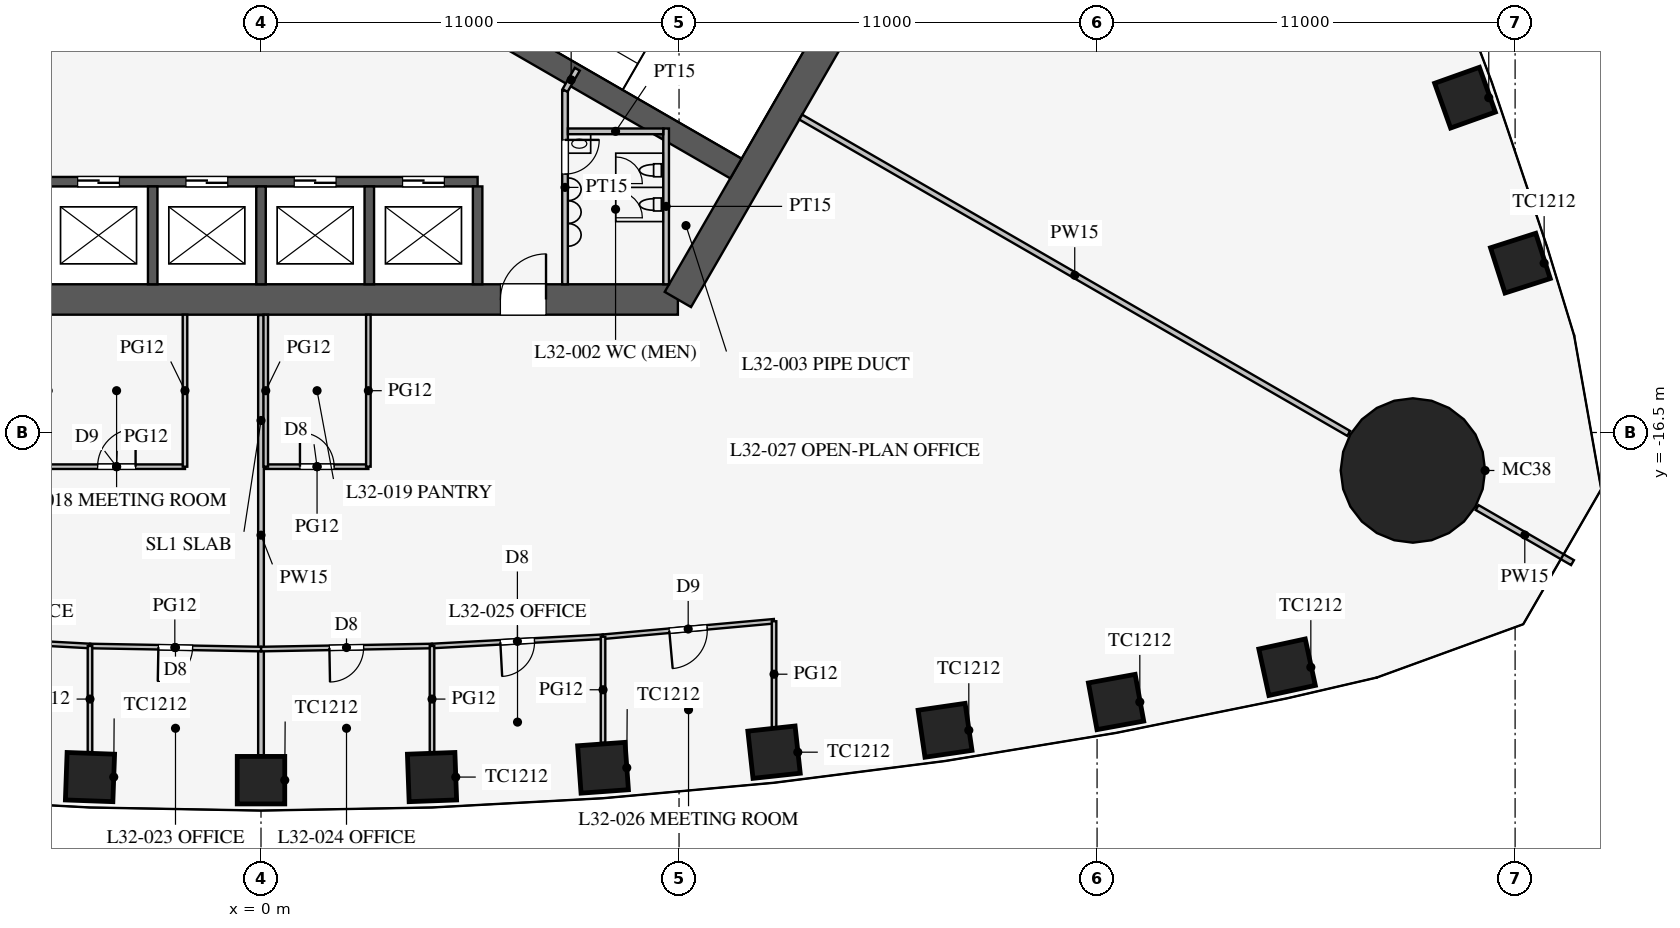
"""IFC4 building model, lengths in metres.
Left out: names, types, materials, properties, quantities, classifications, styles, units other than length and angle.
Written with IfcOpenShell. Run it as: python <this file> out.ifc"""

import sys

from ifc_helpers import new_model, si_unit, direction, frame, frame_2d, origin, origin_2d, place, context, subcontext, project, spatial, rectangle, circle, extrude, element, fill, save


model = new_model("IFC4")
c1 = context("Model", 3, precision=1e-05, world=origin(), true_north=direction((0.0, 1.0)))
c2 = subcontext(c1, "Body", "Model", "MODEL_VIEW")
j1 = project(units=[si_unit("LENGTHUNIT", "METRE"), si_unit("PLANEANGLEUNIT", "RADIAN")], contexts=[c1])
p1 = place(None, origin())
s1 = spatial("IfcSite", under=j1, at=p1, CompositionType="ELEMENT")
p2 = place(p1, origin())
s2 = spatial("IfcBuilding", under=s1, at=p2, CompositionType="ELEMENT")
p3 = place(p2, frame((0.0, 0.0, 140.9)))
s3 = spatial("IfcBuildingStorey", under=s2, at=p3, CompositionType="ELEMENT", Elevation=140.9)
for number, where, z_axis, x_axis in (
    (1, (-4.5, -25.568, 0.0), (0.0, 0.0, 1.0), (0.999, -0.036, 0.0)),
    (2, (0.0, -25.65, 0.0), (0.0, 0.0, 1.0), (1.0, 0.0, 0.0)),
    (3, (4.5, -25.568, 0.0), (0.0, 0.0, 1.0), (0.999, 0.036, 0.0)),
    (4, (9.0, -25.323, 0.0), (0.0, 0.0, 1.0), (0.997, 0.072, 0.0)),
    (5, (13.5, -24.913, 0.0), (0.0, 0.0, 1.0), (0.994, 0.108, 0.0)),
    (6, (18.0, -24.337, 0.0), (0.0, 0.0, 1.0), (0.99, 0.144, 0.0)),
    (7, (22.5, -23.593, 0.0), (0.0, 0.0, 1.0), (0.984, 0.18, 0.0)),
    (8, (27.0, -22.677, 0.0), (0.0, 0.0, 1.0), (0.977, 0.212, 0.0)),
    (9, (33.139, -12.044, 0.0), (0.0, 0.0, 1.0), (-0.305, 0.952, 0.0)),
    (10, (31.682, -7.689, 0.0), (0.0, 0.0, 1.0), (-0.336, 0.942, 0.0)),
):
    element("IfcColumn", number, at=place(p3, frame(where, z_axis=z_axis, x_axis=x_axis)), inside=s3, PredefinedType="COLUMN", context=c2, shape_type="SweptSolid", body=[
        extrude(rectangle(XDim=1.25, YDim=1.25, at=origin_2d()), origin(), (0.0, 0.0, 1.0), 4.2),
    ])
p4 = place(p3, frame((30.311, -17.5, 0.0), z_axis=(0.0, 0.0, 1.0), x_axis=(1.0, 0.0, 0.0)))
e11 = element("IfcColumn", 11, at=p4, inside=s3, PredefinedType="COLUMN", context=c2, shape_type="SweptSolid", body=[
    extrude(circle(Radius=1.9, at=origin_2d()), origin(), (0.0, 0.0, 1.0), 4.2),
])
p5 = place(p3, frame((-10.97, -13.0, 0.0), z_axis=(0.0, 0.0, 1.0), x_axis=(1.0, 0.0, 0.0)))
e12 = element("IfcWall", 12, at=p5, inside=s3, PredefinedType="SHEAR", context=c2, shape_type="SweptSolid", body=[
    extrude(rectangle(XDim=21.939, YDim=0.8, at=frame_2d((10.97, 0.0))), origin(), (0.0, 0.0, 1.0), 4.2),
])
p6 = place(p5, frame((17.27, 0.0, 0.0)))
e13 = element("IfcOpeningElement", 13, at=p6, cuts=e12, PredefinedType="OPENING", context=c2, shape_type="SweptSolid", body=[
    extrude(rectangle(XDim=1.2, YDim=2.1, at=frame_2d((0.6, 1.05))), frame((0.0, 0.41, 0.0), z_axis=(0.0, -1.0, 0.0), x_axis=(1.0, 0.0, 0.0)), (0.0, 0.0, 1.0), 0.82),
])
p7 = place(p5, frame((3.47, 0.0, 0.0)))
e14 = element("IfcOpeningElement", 14, at=p7, cuts=e12, PredefinedType="OPENING", context=c2, shape_type="SweptSolid", body=[
    extrude(rectangle(XDim=1.2, YDim=2.1, at=frame_2d((0.6, 1.05))), frame((0.0, 0.41, 0.0), z_axis=(0.0, -1.0, 0.0), x_axis=(1.0, 0.0, 0.0)), (0.0, 0.0, 1.0), 0.82),
])
p8 = place(p3, frame((10.97, -13.0, 0.0), z_axis=(0.0, 0.0, 1.0), x_axis=(0.499995765644, 0.866027848477, 0.0)))
e15 = element("IfcWall", 15, at=p8, inside=s3, PredefinedType="SHEAR", context=c2, shape_type="SweptSolid", body=[
    extrude(rectangle(XDim=11.547, YDim=0.8, at=frame_2d((5.773, 0.0))), origin(), (0.0, 0.0, 1.0), 4.2),
])
p9 = place(p3, frame((-5.7, -9.9, 0.0), z_axis=(0.0, 0.0, 1.0), x_axis=(1.0, 0.0, 0.0)))
e16 = element("IfcWall", 16, at=p9, inside=s3, PredefinedType="SHEAR", context=c2, shape_type="SweptSolid", body=[
    extrude(rectangle(XDim=11.4, YDim=0.25, at=frame_2d((5.7, 0.0))), origin(), (0.0, 0.0, 1.0), 4.2),
])
p10 = place(p9, frame((0.875, 0.0, 0.0)))
e17 = element("IfcOpeningElement", 17, at=p10, cuts=e16, PredefinedType="OPENING", context=c2, shape_type="SweptSolid", body=[
    extrude(rectangle(XDim=1.1, YDim=2.2, at=frame_2d((0.55, 1.1))), frame((0.0, 0.135, 0.0), z_axis=(0.0, -1.0, 0.0), x_axis=(1.0, 0.0, 0.0)), (0.0, 0.0, 1.0), 0.27),
])
p11 = place(p9, frame((3.725, 0.0, 0.0)))
e18 = element("IfcOpeningElement", 18, at=p11, cuts=e16, PredefinedType="OPENING", context=c2, shape_type="SweptSolid", body=[
    extrude(rectangle(XDim=1.1, YDim=2.2, at=frame_2d((0.55, 1.1))), frame((0.0, 0.135, 0.0), z_axis=(0.0, -1.0, 0.0), x_axis=(1.0, 0.0, 0.0)), (0.0, 0.0, 1.0), 0.27),
])
p12 = place(p9, frame((6.575, 0.0, 0.0)))
e19 = element("IfcOpeningElement", 19, at=p12, cuts=e16, PredefinedType="OPENING", context=c2, shape_type="SweptSolid", body=[
    extrude(rectangle(XDim=1.1, YDim=2.2, at=frame_2d((0.55, 1.1))), frame((0.0, 0.135, 0.0), z_axis=(0.0, -1.0, 0.0), x_axis=(1.0, 0.0, 0.0)), (0.0, 0.0, 1.0), 0.27),
])
p13 = place(p9, frame((9.425, 0.0, 0.0)))
e20 = element("IfcOpeningElement", 20, at=p13, cuts=e16, PredefinedType="OPENING", context=c2, shape_type="SweptSolid", body=[
    extrude(rectangle(XDim=1.1, YDim=2.2, at=frame_2d((0.55, 1.1))), frame((0.0, 0.135, 0.0), z_axis=(0.0, -1.0, 0.0), x_axis=(1.0, 0.0, 0.0)), (0.0, 0.0, 1.0), 0.27),
])
for number, where, z_axis, x_axis in (
    (21, (-2.85, -10.025, 0.0), (0.0, 0.0, 1.0), (0.0, -1.0, 0.0)),
    (22, (0.0, -10.025, 0.0), (0.0, 0.0, 1.0), (0.0, -1.0, 0.0)),
    (23, (2.85, -10.025, 0.0), (0.0, 0.0, 1.0), (0.0, -1.0, 0.0)),
    (24, (5.7, -10.025, 0.0), (0.0, 0.0, 1.0), (0.0, -1.0, 0.0)),
):
    element("IfcWall", number, at=place(p3, frame(where, z_axis=z_axis, x_axis=x_axis)), inside=s3, PredefinedType="SHEAR", context=c2, shape_type="SweptSolid", body=[
        extrude(rectangle(XDim=2.575, YDim=0.25, at=frame_2d((1.288, 0.0))), origin(), (0.0, 0.0, 1.0), 4.2),
    ])
for number, where, z_axis, x_axis in (
    (25, (4.638, -5.016, 0.0), (0.0, 0.0, 1.0), (0.866, -0.5, 0.0)),
    (26, (-4.638, -5.016, 0.0), (0.0, 0.0, 1.0), (-0.866, -0.5, 0.0)),
):
    element("IfcWall", number, at=place(p3, frame(where, z_axis=z_axis, x_axis=x_axis)), inside=s3, PredefinedType="SHEAR", context=c2, shape_type="SweptSolid", body=[
        extrude(rectangle(XDim=9.075, YDim=0.6, at=frame_2d((4.538, 0.0))), origin(), (0.0, 0.0, 1.0), 4.2),
    ])
p14 = place(p3, frame((8.0, -7.5, 0.0), z_axis=(0.0, 0.0, 1.0), x_axis=(0.0, -1.0, 0.0)))
e27 = element("IfcWall", 27, at=p14, inside=s3, PredefinedType="PARTITIONING", context=c2, shape_type="SweptSolid", body=[
    extrude(rectangle(XDim=5.1, YDim=0.15, at=frame_2d((2.55, 0.0))), origin(), (0.0, 0.0, 1.0), 4.0),
])
p15 = place(p14, frame((1.3, 0.0, 0.0)))
e28 = element("IfcOpeningElement", 28, at=p15, cuts=e27, PredefinedType="OPENING", context=c2, shape_type="SweptSolid", body=[
    extrude(rectangle(XDim=0.9, YDim=2.1, at=frame_2d((0.45, 1.05))), frame((0.0, 0.085, 0.0), z_axis=(0.0, -1.0, 0.0), x_axis=(1.0, 0.0, 0.0)), (0.0, 0.0, 1.0), 0.17),
])
p16 = place(p3, frame((8.0, -7.5, 0.0), z_axis=(0.0, 0.0, 1.0), x_axis=(0.499842556608, 0.866116284689, 0.0)))
e29 = element("IfcWall", 29, at=p16, inside=s3, PredefinedType="PARTITIONING", context=c2, shape_type="SweptSolid", body=[
    extrude(rectangle(XDim=0.645, YDim=0.15, at=frame_2d((0.323, 0.0))), origin(), (0.0, 0.0, 1.0), 4.0),
])
p17 = place(p3, frame((10.66, -8.5, 0.0), z_axis=(0.0, 0.0, 1.0), x_axis=(0.0, -1.0, 0.0)))
e30 = element("IfcWall", 30, at=p17, inside=s3, PredefinedType="PARTITIONING", context=c2, shape_type="SweptSolid", body=[
    extrude(rectangle(XDim=4.1, YDim=0.15, at=frame_2d((2.05, 0.0))), origin(), (0.0, 0.0, 1.0), 4.0),
])
p18 = place(p3, frame((8.075, -8.575, 0.0), z_axis=(0.0, 0.0, 1.0), x_axis=(1.0, 0.0, 0.0)))
e31 = element("IfcWall", 31, at=p18, inside=s3, PredefinedType="PARTITIONING", context=c2, shape_type="SweptSolid", body=[
    extrude(rectangle(XDim=2.51, YDim=0.15, at=frame_2d((1.255, 0.0))), origin(), (0.0, 0.0, 1.0), 4.0),
])
p19 = place(p3, frame((14.203, -8.2, 0.0), z_axis=(0.0, 0.0, 1.0), x_axis=(0.866024668836, -0.500001272966, 0.0)))
e32 = element("IfcWall", 32, at=p19, inside=s3, PredefinedType="PARTITIONING", context=c2, shape_type="SweptSolid", body=[
    extrude(rectangle(XDim=16.65, YDim=0.15, at=frame_2d((8.325, 0.0))), origin(), (0.0, 0.0, 1.0), 2.3),
])
p20 = place(p3, frame((32.0, -18.475, 0.0), z_axis=(0.0, 0.0, 1.0), x_axis=(0.866042548026, -0.499970304126, 0.0)))
e33 = element("IfcWall", 33, at=p20, inside=s3, PredefinedType="PARTITIONING", context=c2, shape_type="SweptSolid", body=[
    extrude(rectangle(XDim=2.899, YDim=0.15, at=frame_2d((1.45, 0.0))), origin(), (0.0, 0.0, 1.0), 2.3),
])
p21 = place(p3, frame((0.0, -13.41, 0.0), z_axis=(0.0, 0.0, 1.0), x_axis=(0.0, -1.0, 0.0)))
e34 = element("IfcWall", 34, at=p21, inside=s3, PredefinedType="PARTITIONING", context=c2, shape_type="SweptSolid", body=[
    extrude(rectangle(XDim=11.585, YDim=0.15, at=frame_2d((5.792, 0.0))), origin(), (0.0, 0.0, 1.0), 3.2),
])
p22 = place(p3, frame((0.125, -17.4, 0.0), z_axis=(0.0, 0.0, 1.0), x_axis=(1.0, 0.0, 0.0)))
e35 = element("IfcWall", 35, at=p22, inside=s3, PredefinedType="PARTITIONING", context=c2, shape_type="SweptSolid", body=[
    extrude(rectangle(XDim=2.7, YDim=0.12, at=frame_2d((1.35, 0.0))), origin(), (0.0, 0.0, 1.0), 2.9),
])
p23 = place(p22, frame((0.9, 0.0, 0.15)))
e36 = element("IfcOpeningElement", 36, at=p23, cuts=e35, PredefinedType="OPENING", context=c2, shape_type="SweptSolid", body=[
    extrude(rectangle(XDim=0.9, YDim=2.1, at=frame_2d((0.45, 1.05))), frame((0.0, 0.07, 0.0), z_axis=(0.0, -1.0, 0.0), x_axis=(1.0, 0.0, 0.0)), (0.0, 0.0, 1.0), 0.14),
])
p24 = place(p3, frame((-5.6, -17.4, 0.0), z_axis=(0.0, 0.0, 1.0), x_axis=(1.0, 0.0, 0.0)))
e37 = element("IfcWall", 37, at=p24, inside=s3, PredefinedType="PARTITIONING", context=c2, shape_type="SweptSolid", body=[
    extrude(rectangle(XDim=3.6, YDim=0.12, at=frame_2d((1.8, 0.0))), origin(), (0.0, 0.0, 1.0), 2.9),
])
p25 = place(p24, frame((1.3, 0.0, 0.15)))
e38 = element("IfcOpeningElement", 38, at=p25, cuts=e37, PredefinedType="OPENING", context=c2, shape_type="SweptSolid", body=[
    extrude(rectangle(XDim=1.0, YDim=2.1, at=frame_2d((0.5, 1.05))), frame((0.0, 0.07, 0.0), z_axis=(0.0, -1.0, 0.0), x_axis=(1.0, 0.0, 0.0)), (0.0, 0.0, 1.0), 0.14),
])
for number, where, z_axis, x_axis in (
    (39, (0.125, -13.4, 0.0), (0.0, 0.0, 1.0), (0.0, -1.0, 0.0)),
    (40, (2.825, -13.4, 0.0), (0.0, 0.0, 1.0), (0.0, -1.0, 0.0)),
    (41, (-2.0, -13.4, 0.0), (0.0, 0.0, 1.0), (0.0, -1.0, 0.0)),
):
    element("IfcWall", number, at=place(p3, frame(where, z_axis=z_axis, x_axis=x_axis)), inside=s3, PredefinedType="PARTITIONING", context=c2, shape_type="SweptSolid", body=[
        extrude(rectangle(XDim=4.0, YDim=0.12, at=frame_2d((2.0, 0.0))), origin(), (0.0, 0.0, 1.0), 2.9),
    ])
p26 = place(p3, frame((0.0, -22.2, 0.0), z_axis=(0.0, 0.0, 1.0), x_axis=(0.999837820638, 0.018009231578, 0.0)))
e42 = element("IfcWall", 42, at=p26, inside=s3, PredefinedType="PARTITIONING", context=c2, shape_type="SweptSolid", body=[
    extrude(rectangle(XDim=4.501, YDim=0.12, at=frame_2d((2.25, 0.0))), origin(), (0.0, 0.0, 1.0), 2.9),
])
p27 = place(p26, frame((1.8, 0.0, 0.15)))
e43 = element("IfcOpeningElement", 43, at=p27, cuts=e42, PredefinedType="OPENING", context=c2, shape_type="SweptSolid", body=[
    extrude(rectangle(XDim=0.9, YDim=2.1, at=frame_2d((0.45, 1.05))), frame((0.0, 0.07, 0.0), z_axis=(0.0, -1.0, 0.0), x_axis=(1.0, 0.0, 0.0)), (0.0, 0.0, 1.0), 0.14),
])
p28 = place(p3, frame((4.5, -22.119, 0.0), z_axis=(0.0, 0.0, 1.0), x_axis=(0.998537376538, 0.054065771581, 0.0)))
e44 = element("IfcWall", 44, at=p28, inside=s3, PredefinedType="PARTITIONING", context=c2, shape_type="SweptSolid", body=[
    extrude(rectangle(XDim=4.507, YDim=0.12, at=frame_2d((2.253, 0.0))), origin(), (0.0, 0.0, 1.0), 2.9),
])
p29 = place(p28, frame((1.8, 0.0, 0.15)))
e45 = element("IfcOpeningElement", 45, at=p29, cuts=e44, PredefinedType="OPENING", context=c2, shape_type="SweptSolid", body=[
    extrude(rectangle(XDim=0.9, YDim=2.1, at=frame_2d((0.45, 1.05))), frame((0.0, 0.07, 0.0), z_axis=(0.0, -1.0, 0.0), x_axis=(1.0, 0.0, 0.0)), (0.0, 0.0, 1.0), 0.14),
])
p30 = place(p3, frame((9.0, -21.875, 0.0), z_axis=(0.0, 0.0, 1.0), x_axis=(0.995930325215, 0.090126507295, 0.0)))
e46 = element("IfcWall", 46, at=p30, inside=s3, PredefinedType="PARTITIONING", context=c2, shape_type="SweptSolid", body=[
    extrude(rectangle(XDim=4.518, YDim=0.12, at=frame_2d((2.259, 0.0))), origin(), (0.0, 0.0, 1.0), 2.9),
])
p31 = place(p30, frame((1.75, 0.0, 0.15)))
e47 = element("IfcOpeningElement", 47, at=p31, cuts=e46, PredefinedType="OPENING", context=c2, shape_type="SweptSolid", body=[
    extrude(rectangle(XDim=1.0, YDim=2.1, at=frame_2d((0.5, 1.05))), frame((0.0, 0.07, 0.0), z_axis=(0.0, -1.0, 0.0), x_axis=(1.0, 0.0, 0.0)), (0.0, 0.0, 1.0), 0.14),
])
p32 = place(p3, frame((-4.5, -22.119, 0.0), z_axis=(0.0, 0.0, 1.0), x_axis=(0.999837820638, -0.018009231578, 0.0)))
e48 = element("IfcWall", 48, at=p32, inside=s3, PredefinedType="PARTITIONING", context=c2, shape_type="SweptSolid", body=[
    extrude(rectangle(XDim=4.501, YDim=0.12, at=frame_2d((2.25, 0.0))), origin(), (0.0, 0.0, 1.0), 2.9),
])
p33 = place(p32, frame((1.8, 0.0, 0.15)))
e49 = element("IfcOpeningElement", 49, at=p33, cuts=e48, PredefinedType="OPENING", context=c2, shape_type="SweptSolid", body=[
    extrude(rectangle(XDim=0.9, YDim=2.1, at=frame_2d((0.45, 1.05))), frame((0.0, 0.07, 0.0), z_axis=(0.0, -1.0, 0.0), x_axis=(1.0, 0.0, 0.0)), (0.0, 0.0, 1.0), 0.14),
])
p34 = place(p3, frame((-9.0, -21.875, 0.0), z_axis=(0.0, 0.0, 1.0), x_axis=(0.998537376538, -0.054065771581, 0.0)))
e50 = element("IfcWall", 50, at=p34, inside=s3, PredefinedType="PARTITIONING", context=c2, shape_type="SweptSolid", body=[
    extrude(rectangle(XDim=4.507, YDim=0.12, at=frame_2d((2.253, 0.0))), origin(), (0.0, 0.0, 1.0), 2.9),
])
p35 = place(p34, frame((1.8, 0.0, 0.15)))
e51 = element("IfcOpeningElement", 51, at=p35, cuts=e50, PredefinedType="OPENING", context=c2, shape_type="SweptSolid", body=[
    extrude(rectangle(XDim=0.9, YDim=2.1, at=frame_2d((0.45, 1.05))), frame((0.0, 0.07, 0.0), z_axis=(0.0, -1.0, 0.0), x_axis=(1.0, 0.0, 0.0)), (0.0, 0.0, 1.0), 0.14),
])
p36 = place(p3, frame((13.5, -21.468, 0.0), z_axis=(0.0, 0.0, 1.0), x_axis=(0.0, -1.0, 0.0)))
e52 = element("IfcWall", 52, at=p36, inside=s3, PredefinedType="PARTITIONING", context=c2, shape_type="SweptSolid", body=[
    extrude(rectangle(XDim=2.787, YDim=0.12, at=frame_2d((1.393, 0.0))), origin(), (0.0, 0.0, 1.0), 2.9),
])
p37 = place(p3, frame((4.5, -22.119, 0.0), z_axis=(0.0, 0.0, 1.0), x_axis=(0.0, -1.0, 0.0)))
e53 = element("IfcWall", 53, at=p37, inside=s3, PredefinedType="PARTITIONING", context=c2, shape_type="SweptSolid", body=[
    extrude(rectangle(XDim=2.794, YDim=0.12, at=frame_2d((1.397, 0.0))), origin(), (0.0, 0.0, 1.0), 2.9),
])
p38 = place(p3, frame((9.0, -21.875, 0.0), z_axis=(0.0, 0.0, 1.0), x_axis=(0.0, -1.0, 0.0)))
e54 = element("IfcWall", 54, at=p38, inside=s3, PredefinedType="PARTITIONING", context=c2, shape_type="SweptSolid", body=[
    extrude(rectangle(XDim=2.791, YDim=0.12, at=frame_2d((1.396, 0.0))), origin(), (0.0, 0.0, 1.0), 2.9),
])
p39 = place(p3, frame((-4.5, -22.119, 0.0), z_axis=(0.0, 0.0, 1.0), x_axis=(0.0, -1.0, 0.0)))
e55 = element("IfcWall", 55, at=p39, inside=s3, PredefinedType="PARTITIONING", context=c2, shape_type="SweptSolid", body=[
    extrude(rectangle(XDim=2.794, YDim=0.12, at=frame_2d((1.397, 0.0))), origin(), (0.0, 0.0, 1.0), 2.9),
])
p40 = place(p15, origin())
e56 = element("IfcDoor", 56, at=p40, inside=s3, OperationType="SINGLE_SWING_LEFT", PredefinedType="DOOR", context=c2, shape_type="SweptSolid", body=[
    extrude(rectangle(XDim=0.9, YDim=2.1, at=frame_2d((0.45, 1.05))), frame((0.0, 0.025, 0.0), z_axis=(0.0, -1.0, 0.0), x_axis=(1.0, 0.0, 0.0)), (0.0, 0.0, 1.0), 0.05),
])
fill(e28, e56)
p41 = place(p6, origin())
e57 = element("IfcDoor", 57, at=p41, inside=s3, OperationType="SINGLE_SWING_RIGHT", PredefinedType="DOOR", context=c2, shape_type="SweptSolid", body=[
    extrude(rectangle(XDim=1.2, YDim=2.1, at=frame_2d((0.6, 1.05))), frame((0.0, 0.025, 0.0), z_axis=(0.0, -1.0, 0.0), x_axis=(1.0, 0.0, 0.0)), (0.0, 0.0, 1.0), 0.05),
])
fill(e13, e57)
p42 = place(p25, origin())
e58 = element("IfcDoor", 58, at=p42, inside=s3, OperationType="SINGLE_SWING_RIGHT", PredefinedType="DOOR", context=c2, shape_type="SweptSolid", body=[
    extrude(rectangle(XDim=1.0, YDim=2.1, at=frame_2d((0.5, 1.05))), frame((0.0, 0.025, 0.0), z_axis=(0.0, -1.0, 0.0), x_axis=(1.0, 0.0, 0.0)), (0.0, 0.0, 1.0), 0.05),
])
fill(e38, e58)
p43 = place(p23, origin())
e59 = element("IfcDoor", 59, at=p43, inside=s3, OperationType="SINGLE_SWING_LEFT", PredefinedType="DOOR", context=c2, shape_type="SweptSolid", body=[
    extrude(rectangle(XDim=0.9, YDim=2.1, at=frame_2d((0.45, 1.05))), frame((0.0, 0.025, 0.0), z_axis=(0.0, -1.0, 0.0), x_axis=(1.0, 0.0, 0.0)), (0.0, 0.0, 1.0), 0.05),
])
fill(e36, e59)
p44 = place(p33, frame((0.9, 0.0, 0.0), z_axis=(0.0, 0.0, 1.0), x_axis=(-1.0, 0.0, 0.0)))
e60 = element("IfcDoor", 60, at=p44, inside=s3, OperationType="SINGLE_SWING_RIGHT", PredefinedType="DOOR", context=c2, shape_type="SweptSolid", body=[
    extrude(rectangle(XDim=0.9, YDim=2.1, at=frame_2d((0.45, 1.05))), frame((0.0, 0.025, 0.0), z_axis=(0.0, -1.0, 0.0), x_axis=(1.0, 0.0, 0.0)), (0.0, 0.0, 1.0), 0.05),
])
fill(e49, e60)
p45 = place(p27, frame((0.9, 0.0, 0.0), z_axis=(0.0, 0.0, 1.0), x_axis=(-1.0, 0.0, 0.0)))
e61 = element("IfcDoor", 61, at=p45, inside=s3, OperationType="SINGLE_SWING_RIGHT", PredefinedType="DOOR", context=c2, shape_type="SweptSolid", body=[
    extrude(rectangle(XDim=0.9, YDim=2.1, at=frame_2d((0.45, 1.05))), frame((0.0, 0.025, 0.0), z_axis=(0.0, -1.0, 0.0), x_axis=(1.0, 0.0, 0.0)), (0.0, 0.0, 1.0), 0.05),
])
fill(e43, e61)
p46 = place(p29, frame((0.9, 0.0, 0.0), z_axis=(0.0, 0.0, 1.0), x_axis=(-1.0, 0.0, 0.0)))
e62 = element("IfcDoor", 62, at=p46, inside=s3, OperationType="SINGLE_SWING_RIGHT", PredefinedType="DOOR", context=c2, shape_type="SweptSolid", body=[
    extrude(rectangle(XDim=0.9, YDim=2.1, at=frame_2d((0.45, 1.05))), frame((0.0, 0.025, 0.0), z_axis=(0.0, -1.0, 0.0), x_axis=(1.0, 0.0, 0.0)), (0.0, 0.0, 1.0), 0.05),
])
fill(e45, e62)
p47 = place(p31, frame((1.0, 0.0, 0.0), z_axis=(0.0, 0.0, 1.0), x_axis=(-1.0, 0.0, 0.0)))
e63 = element("IfcDoor", 63, at=p47, inside=s3, OperationType="SINGLE_SWING_RIGHT", PredefinedType="DOOR", context=c2, shape_type="SweptSolid", body=[
    extrude(rectangle(XDim=1.0, YDim=2.1, at=frame_2d((0.5, 1.05))), frame((0.0, 0.025, 0.0), z_axis=(0.0, -1.0, 0.0), x_axis=(1.0, 0.0, 0.0)), (0.0, 0.0, 1.0), 0.05),
])
fill(e47, e63)
p48 = place(p10, origin())
e64 = element("IfcDoor", 64, at=p48, inside=s3, OperationType="DOUBLE_DOOR_SLIDING", PredefinedType="DOOR", context=c2, shape_type="SweptSolid", body=[
    extrude(rectangle(XDim=1.1, YDim=2.2, at=frame_2d((0.55, 1.1))), frame((0.0, 0.025, 0.0), z_axis=(0.0, -1.0, 0.0), x_axis=(1.0, 0.0, 0.0)), (0.0, 0.0, 1.0), 0.05),
])
fill(e17, e64)
p49 = place(p11, origin())
e65 = element("IfcDoor", 65, at=p49, inside=s3, OperationType="DOUBLE_DOOR_SLIDING", PredefinedType="DOOR", context=c2, shape_type="SweptSolid", body=[
    extrude(rectangle(XDim=1.1, YDim=2.2, at=frame_2d((0.55, 1.1))), frame((0.0, 0.025, 0.0), z_axis=(0.0, -1.0, 0.0), x_axis=(1.0, 0.0, 0.0)), (0.0, 0.0, 1.0), 0.05),
])
fill(e18, e65)
p50 = place(p12, origin())
e66 = element("IfcDoor", 66, at=p50, inside=s3, OperationType="DOUBLE_DOOR_SLIDING", PredefinedType="DOOR", context=c2, shape_type="SweptSolid", body=[
    extrude(rectangle(XDim=1.1, YDim=2.2, at=frame_2d((0.55, 1.1))), frame((0.0, 0.025, 0.0), z_axis=(0.0, -1.0, 0.0), x_axis=(1.0, 0.0, 0.0)), (0.0, 0.0, 1.0), 0.05),
])
fill(e19, e66)
p51 = place(p13, origin())
e67 = element("IfcDoor", 67, at=p51, inside=s3, OperationType="DOUBLE_DOOR_SLIDING", PredefinedType="DOOR", context=c2, shape_type="SweptSolid", body=[
    extrude(rectangle(XDim=1.1, YDim=2.2, at=frame_2d((0.55, 1.1))), frame((0.0, 0.025, 0.0), z_axis=(0.0, -1.0, 0.0), x_axis=(1.0, 0.0, 0.0)), (0.0, 0.0, 1.0), 0.05),
])
fill(e20, e67)
save(model, sys.argv[1])
